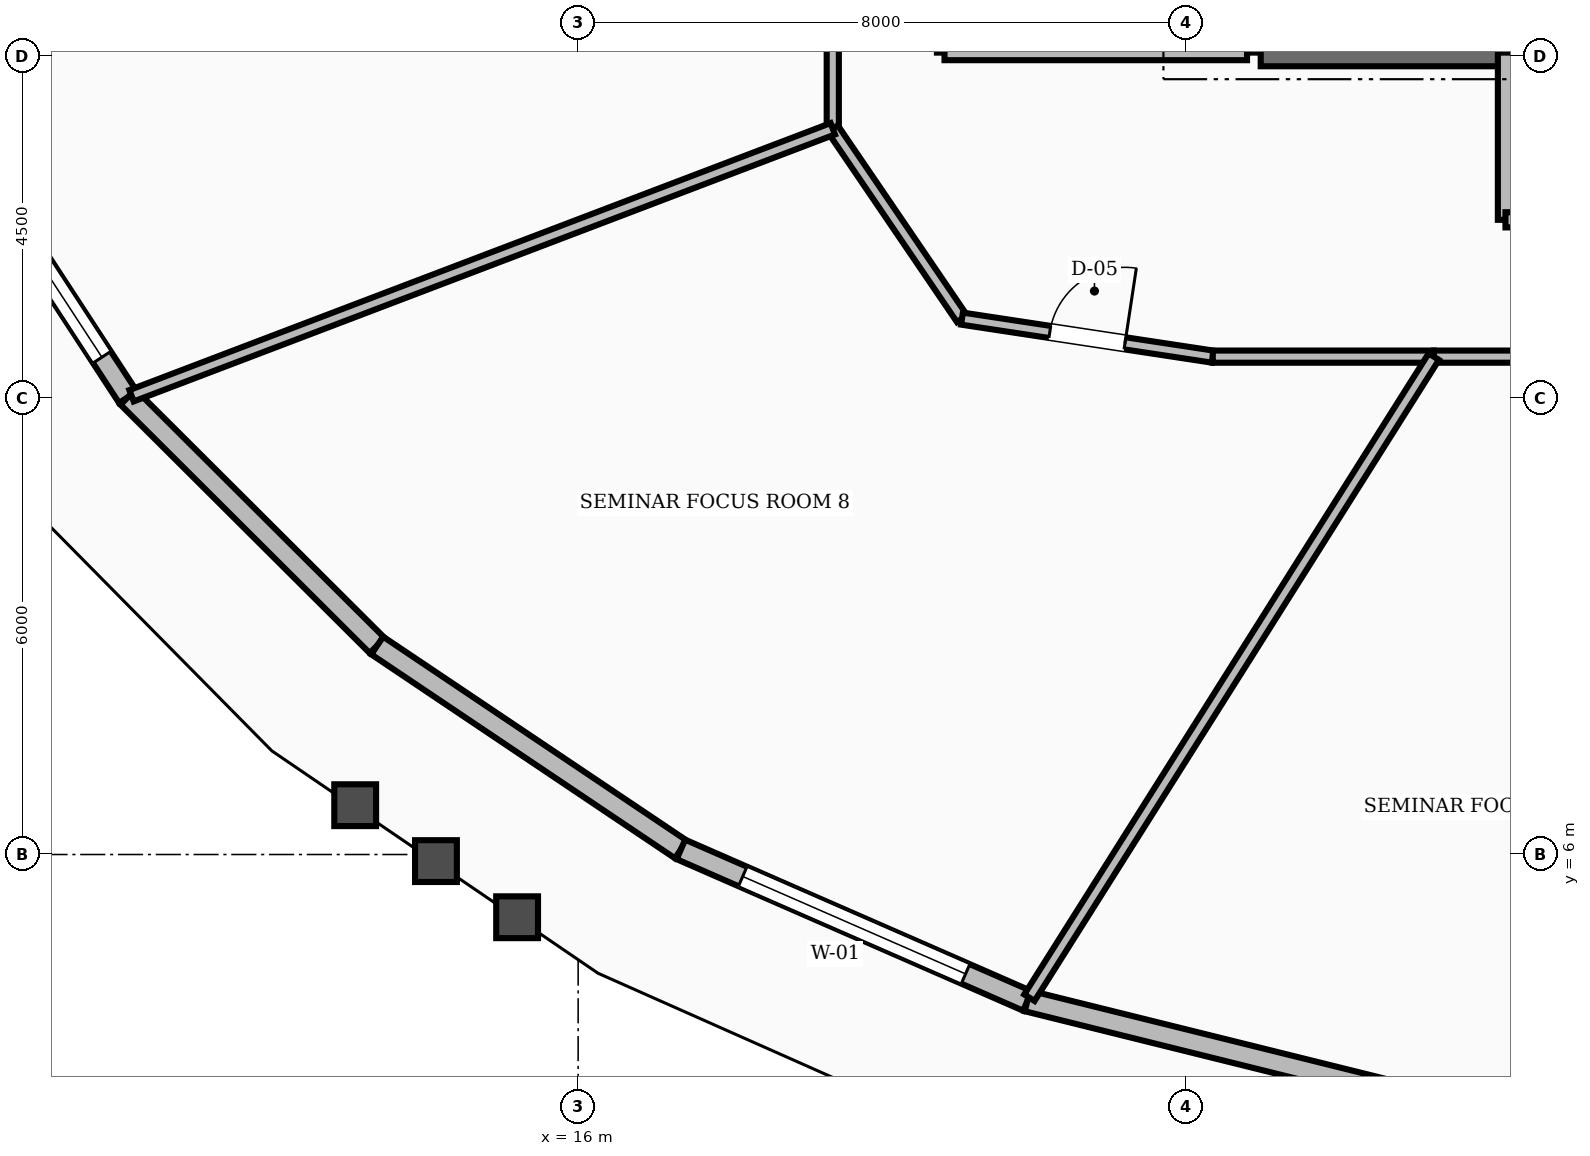
"""IFC4 building model, lengths in metres.
Left out: names, types, materials, properties, quantities, classifications, styles, units other than length and angle.
Written with IfcOpenShell. Run it as: python <this file> out.ifc"""

import sys

from ifc_helpers import new_model, si_unit, direction, frame, frame_2d, origin, place, context, subcontext, project, spatial, rectangle, extrude, element, fill, save


model = new_model("IFC4")
c1 = context("Model", 3, precision=1e-05, world=origin(), true_north=direction((0.0, 1.0)))
c2 = subcontext(c1, "Body", "Model", "MODEL_VIEW")
j1 = project(units=[si_unit("LENGTHUNIT", "METRE"), si_unit("PLANEANGLEUNIT", "RADIAN")], contexts=[c1])
p1 = place(None, origin())
s1 = spatial("IfcSite", under=j1, at=p1, CompositionType="ELEMENT")
p2 = place(p1, origin())
s2 = spatial("IfcBuilding", under=s1, at=p2, CompositionType="ELEMENT")
p3 = place(p2, frame((0.0, 0.0, 149.6)))
s3 = spatial("IfcBuildingStorey", under=s2, at=p3, CompositionType="ELEMENT", Elevation=149.6)
p4 = place(p3, frame((24.98, 16.55, 0.0), z_axis=(0.0, 0.0, 1.0), x_axis=(1.0, 0.0, 0.0)))
e1 = element("IfcWall", 1, at=p4, inside=s3, PredefinedType="SHEAR", context=c2, shape_type="SweptSolid", body=[
    extrude(rectangle(XDim=3.22, YDim=0.36, at=frame_2d((1.61, 0.0))), origin(), (0.0, 0.0, 1.0), 3.6),
])
p5 = place(p3, frame((7.641, 15.746, 0.0), z_axis=(0.0, 0.0, 1.0), x_axis=(0.547011581396, -0.837125038342, 0.0)))
e2 = element("IfcWall", 2, at=p5, inside=s3, PredefinedType="STANDARD", context=c2, shape_type="SweptSolid", body=[
    extrude(rectangle(XDim=4.454, YDim=0.28, at=frame_2d((2.227, 0.0))), origin(), (0.0, 0.0, 1.0), 2.82),
])
p6 = place(p5, frame((0.627, 0.0, 0.8)))
e3 = element("IfcOpeningElement", 3, at=p6, cuts=e2, PredefinedType="OPENING", context=c2, shape_type="SweptSolid", body=[
    extrude(rectangle(XDim=3.2, YDim=1.65, at=frame_2d((1.6, 0.825))), frame((0.0, 0.15, 0.0), z_axis=(0.0, -1.0, 0.0), x_axis=(1.0, 0.0, 0.0)), (0.0, 0.0, 1.0), 0.3),
])
p7 = place(p3, frame((10.078, 12.018, 0.0), z_axis=(0.0, 0.0, 1.0), x_axis=(0.708239604084, -0.705972140532, 0.0)))
e4 = element("IfcWall", 4, at=p7, inside=s3, PredefinedType="STANDARD", context=c2, shape_type="SweptSolid", body=[
    extrude(rectangle(XDim=4.63, YDim=0.28, at=frame_2d((2.315, 0.0))), origin(), (0.0, 0.0, 1.0), 2.82),
])
p8 = place(p3, frame((13.357, 8.749, 0.0), z_axis=(0.0, 0.0, 1.0), x_axis=(0.830250648056, -0.557390223634, 0.0)))
e5 = element("IfcWall", 5, at=p8, inside=s3, PredefinedType="STANDARD", context=c2, shape_type="SweptSolid", body=[
    extrude(rectangle(XDim=4.812, YDim=0.28, at=frame_2d((2.406, 0.0))), origin(), (0.0, 0.0, 1.0), 2.82),
])
p9 = place(p3, frame((17.352, 6.067, 0.0), z_axis=(0.0, 0.0, 1.0), x_axis=(0.916239532795, -0.400630900634, 0.0)))
e6 = element("IfcWall", 6, at=p9, inside=s3, PredefinedType="STANDARD", context=c2, shape_type="SweptSolid", body=[
    extrude(rectangle(XDim=4.975, YDim=0.28, at=frame_2d((2.488, 0.0))), origin(), (0.0, 0.0, 1.0), 2.82),
])
p10 = place(p9, frame((0.887, 0.0, 0.8)))
e7 = element("IfcOpeningElement", 7, at=p10, cuts=e6, PredefinedType="OPENING", context=c2, shape_type="SweptSolid", body=[
    extrude(rectangle(XDim=3.2, YDim=1.65, at=frame_2d((1.6, 0.825))), frame((0.0, 0.15, 0.0), z_axis=(0.0, -1.0, 0.0), x_axis=(1.0, 0.0, 0.0)), (0.0, 0.0, 1.0), 0.3),
])
p11 = place(p3, frame((21.91, 4.074, 0.0), z_axis=(0.0, 0.0, 1.0), x_axis=(0.97056654197, -0.24083311153, 0.0)))
e8 = element("IfcWall", 8, at=p11, inside=s3, PredefinedType="STANDARD", context=c2, shape_type="SweptSolid", body=[
    extrude(rectangle(XDim=5.096, YDim=0.28, at=frame_2d((2.548, 0.0))), origin(), (0.0, 0.0, 1.0), 2.82),
])
p12 = place(p3, frame((20.82, 16.55, 0.0), z_axis=(0.0, 0.0, 1.0), x_axis=(1.0, 0.0, 0.0)))
e9 = element("IfcWall", 9, at=p12, inside=s3, PredefinedType="SOLIDWALL", context=c2, shape_type="SweptSolid", body=[
    extrude(rectangle(XDim=3.98, YDim=0.2, at=frame_2d((1.99, 0.0))), origin(), (0.0, 0.0, 1.0), 2.8),
])
p13 = place(p3, frame((28.2, 14.35, 0.0), z_axis=(0.0, 0.0, 1.0), x_axis=(0.0, 1.0, 0.0)))
e10 = element("IfcWall", 10, at=p13, inside=s3, PredefinedType="SOLIDWALL", context=c2, shape_type="SweptSolid", body=[
    extrude(rectangle(XDim=2.2, YDim=0.2, at=frame_2d((1.1, 0.0))), origin(), (0.0, 0.0, 1.0), 2.8),
])
p14 = place(p3, frame((28.2, 14.35, 0.0), z_axis=(0.0, 0.0, 1.0), x_axis=(1.0, 0.0, 0.0)))
e11 = element("IfcWall", 11, at=p14, inside=s3, PredefinedType="SOLIDWALL", context=c2, shape_type="SweptSolid", body=[
    extrude(rectangle(XDim=7.6, YDim=0.2, at=frame_2d((3.8, 0.0))), origin(), (0.0, 0.0, 1.0), 2.8),
])
p15 = place(p14, frame((3.2, 0.0, 0.0)))
e12 = element("IfcOpeningElement", 12, at=p15, cuts=e11, PredefinedType="OPENING", context=c2, shape_type="SweptSolid", body=[
    extrude(rectangle(XDim=1.2, YDim=2.1, at=frame_2d((0.6, 1.05))), frame((0.0, 0.11, 0.0), z_axis=(0.0, -1.0, 0.0), x_axis=(1.0, 0.0, 0.0)), (0.0, 0.0, 1.0), 0.22),
])
p16 = place(p3, frame((19.35, 18.76, 0.0), z_axis=(0.0, 0.0, 1.0), x_axis=(0.0, -1.0, 0.0)))
e13 = element("IfcWall", 13, at=p16, inside=s3, PredefinedType="SOLIDWALL", context=c2, shape_type="SweptSolid", body=[
    extrude(rectangle(XDim=3.213, YDim=0.16, at=frame_2d((1.606, 0.0))), origin(), (0.0, 0.0, 1.0), 2.8),
])
p17 = place(p3, frame((19.35, 15.548, 0.0), z_axis=(0.0, 0.0, 1.0), x_axis=(0.562674669208, -0.826678423955, 0.0)))
e14 = element("IfcWall", 14, at=p17, inside=s3, PredefinedType="SOLIDWALL", context=c2, shape_type="SweptSolid", body=[
    extrude(rectangle(XDim=3.021, YDim=0.16, at=frame_2d((1.511, 0.0))), origin(), (0.0, 0.0, 1.0), 2.8),
])
p18 = place(p3, frame((21.05, 13.05, 0.0), z_axis=(0.0, 0.0, 1.0), x_axis=(0.988710906508, -0.149835721217, 0.0)))
e15 = element("IfcWall", 15, at=p18, inside=s3, PredefinedType="SOLIDWALL", context=c2, shape_type="SweptSolid", body=[
    extrude(rectangle(XDim=3.337, YDim=0.16, at=frame_2d((1.668, 0.0))), origin(), (0.0, 0.0, 1.0), 2.8),
])
p19 = place(p18, frame((1.168, 0.0, 0.0)))
e16 = element("IfcOpeningElement", 16, at=p19, cuts=e15, PredefinedType="OPENING", context=c2, shape_type="SweptSolid", body=[
    extrude(rectangle(XDim=1.0, YDim=2.1, at=frame_2d((0.5, 1.05))), frame((0.0, 0.09, 0.0), z_axis=(0.0, -1.0, 0.0), x_axis=(1.0, 0.0, 0.0)), (0.0, 0.0, 1.0), 0.18),
])
p20 = place(p3, frame((24.349, 12.55, 0.0), z_axis=(0.0, 0.0, 1.0), x_axis=(1.0, 0.0, 0.0)))
e17 = element("IfcWall", 17, at=p20, inside=s3, PredefinedType="SOLIDWALL", context=c2, shape_type="SweptSolid", body=[
    extrude(rectangle(XDim=2.908, YDim=0.16, at=frame_2d((1.454, 0.0))), origin(), (0.0, 0.0, 1.0), 2.8),
])
p21 = place(p3, frame((27.257, 12.55, 0.0), z_axis=(0.0, 0.0, 1.0), x_axis=(1.0, 0.0, 0.0)))
e18 = element("IfcWall", 18, at=p21, inside=s3, PredefinedType="SOLIDWALL", context=c2, shape_type="SweptSolid", body=[
    extrude(rectangle(XDim=2.465, YDim=0.16, at=frame_2d((1.232, 0.0))), origin(), (0.0, 0.0, 1.0), 2.8),
])
p22 = place(p3, frame((19.35, 15.548, 0.0), z_axis=(0.0, 0.0, 1.0), x_axis=(-0.934568417975, -0.355783462409, 0.0)))
e19 = element("IfcWall", 19, at=p22, inside=s3, PredefinedType="SOLIDWALL", context=c2, shape_type="SweptSolid", body=[
    extrude(rectangle(XDim=9.872, YDim=0.16, at=frame_2d((4.936, 0.0))), origin(), (0.0, 0.0, 1.0), 2.8),
])
p23 = place(p3, frame((27.257, 12.55, 0.0), z_axis=(0.0, 0.0, 1.0), x_axis=(-0.533539707284, -0.84577501781, 0.0)))
e20 = element("IfcWall", 20, at=p23, inside=s3, PredefinedType="SOLIDWALL", context=c2, shape_type="SweptSolid", body=[
    extrude(rectangle(XDim=9.972, YDim=0.16, at=frame_2d((4.986, 0.0))), origin(), (0.0, 0.0, 1.0), 2.8),
])
p24 = place(p6, origin())
e21 = element("IfcWindow", 21, at=p24, inside=s3, PartitioningType="SINGLE_PANEL", PredefinedType="WINDOW", context=c2, shape_type="SweptSolid", body=[
    extrude(rectangle(XDim=3.2, YDim=1.65, at=frame_2d((1.6, 0.825))), frame((0.0, 0.03, 0.0), z_axis=(0.0, -1.0, 0.0), x_axis=(1.0, 0.0, 0.0)), (0.0, 0.0, 1.0), 0.06),
])
fill(e3, e21)
p25 = place(p10, origin())
e22 = element("IfcWindow", 22, at=p25, inside=s3, PartitioningType="SINGLE_PANEL", PredefinedType="WINDOW", context=c2, shape_type="SweptSolid", body=[
    extrude(rectangle(XDim=3.2, YDim=1.65, at=frame_2d((1.6, 0.825))), frame((0.0, 0.03, 0.0), z_axis=(0.0, -1.0, 0.0), x_axis=(1.0, 0.0, 0.0)), (0.0, 0.0, 1.0), 0.06),
])
fill(e7, e22)
p26 = place(p19, origin())
e23 = element("IfcDoor", 23, at=p26, inside=s3, OperationType="SINGLE_SWING_RIGHT", PredefinedType="DOOR", context=c2, shape_type="SweptSolid", body=[
    extrude(rectangle(XDim=1.0, YDim=2.1, at=frame_2d((0.5, 1.05))), frame((0.0, 0.025, 0.0), z_axis=(0.0, -1.0, 0.0), x_axis=(1.0, 0.0, 0.0)), (0.0, 0.0, 1.0), 0.05),
])
fill(e16, e23)
save(model, sys.argv[1])
